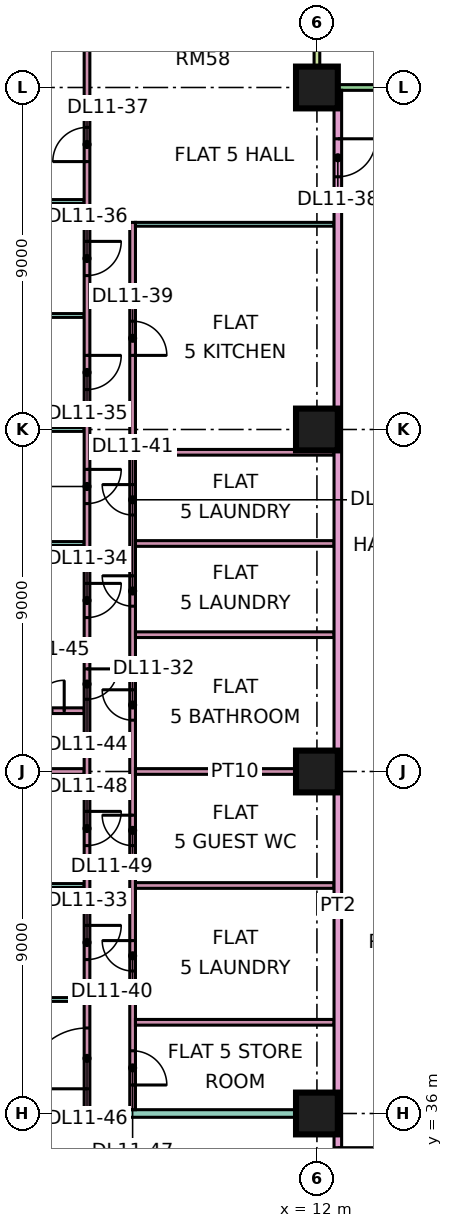
"""IFC4 building model, lengths in metres.
Left out: names, types, materials, properties, quantities, classifications, styles, units other than length and angle.
Written with IfcOpenShell. Run it as: python <this file> out.ifc"""

import sys

from ifc_helpers import new_model, si_unit, direction, frame, frame_2d, origin, origin_2d, place, context, subcontext, project, spatial, rectangle, extrude, element, fill, save


model = new_model("IFC4")
c1 = context("Model", 3, precision=1e-05, world=origin(), true_north=direction((0.0, 1.0)))
c2 = subcontext(c1, "Body", "Model", "MODEL_VIEW")
j1 = project(units=[si_unit("LENGTHUNIT", "METRE"), si_unit("PLANEANGLEUNIT", "RADIAN")], contexts=[c1])
p1 = place(None, origin())
s1 = spatial("IfcSite", under=j1, at=p1, CompositionType="ELEMENT")
p2 = place(p1, origin())
s2 = spatial("IfcBuilding", under=s1, at=p2, CompositionType="ELEMENT")
p3 = place(p2, frame((0.0, 0.0, 56.4)))
s3 = spatial("IfcBuildingStorey", under=s2, at=p3, CompositionType="ELEMENT", Elevation=56.4)
for number, where, z_axis, x_axis in (
    (1, (12.0, 36.0, 0.0), (0.0, 0.0, 1.0), (1.0, 0.0, 0.0)),
    (2, (12.0, 45.0, 0.0), (0.0, 0.0, 1.0), (1.0, 0.0, 0.0)),
    (3, (12.0, 54.0, 0.0), (0.0, 0.0, 1.0), (1.0, 0.0, 0.0)),
    (4, (12.0, 63.0, 0.0), (0.0, 0.0, 1.0), (1.0, 0.0, 0.0)),
):
    element("IfcColumn", number, at=place(p3, frame(where, z_axis=z_axis, x_axis=x_axis)), inside=s3, PredefinedType="COLUMN", context=c2, shape_type="SweptSolid", body=[
        extrude(rectangle(XDim=1.1, YDim=1.1, at=origin_2d()), origin(), (0.0, 0.0, 1.0), 3.75),
    ])
p4 = place(p3, frame((22.425, 63.0, 0.0), z_axis=(0.0, 0.0, 1.0), x_axis=(-1.0, 0.0, 0.0)))
e5 = element("IfcWall", 5, at=p4, inside=s3, PredefinedType="SOLIDWALL", context=c2, shape_type="SweptSolid", body=[
    extrude(rectangle(XDim=10.35, YDim=0.15, at=frame_2d((5.175, 0.0))), origin(), (0.0, 0.0, 1.0), 3.35),
])
p5 = place(p4, frame((2.512, 0.0, 0.0)))
e6 = element("IfcOpeningElement", 6, at=p5, cuts=e5, PredefinedType="OPENING", context=c2, shape_type="SweptSolid", body=[
    extrude(rectangle(XDim=1.8, YDim=2.4, at=frame_2d((0.9, 1.2))), frame((0.0, 0.085, 0.0), z_axis=(0.0, -1.0, 0.0), x_axis=(1.0, 0.0, 0.0)), (0.0, 0.0, 1.0), 0.17),
])
p6 = place(p3, frame((12.0, 64.5, 0.0), z_axis=(0.0, 0.0, 1.0), x_axis=(0.0, -1.0, 0.0)))
e7 = element("IfcWall", 7, at=p6, inside=s3, PredefinedType="SOLIDWALL", context=c2, shape_type="SweptSolid", body=[
    extrude(rectangle(XDim=1.5, YDim=0.15, at=frame_2d((0.75, 0.0))), origin(), (0.0, 0.0, 1.0), 3.35),
])
for number, where, z_axis, x_axis in (
    (8, (-1.351, 57.0, 0.0), (0.0, 0.0, 1.0), (1.0, 0.0, 0.0)),
    (9, (-1.351, 60.0, 0.0), (0.0, 0.0, 1.0), (1.0, 0.0, 0.0)),
):
    element("IfcWall", number, at=place(p3, frame(where, z_axis=z_axis, x_axis=x_axis)), inside=s3, PredefinedType="PARTITIONING", context=c2, shape_type="SweptSolid", body=[
        extrude(rectangle(XDim=7.226, YDim=0.1, at=frame_2d((3.613, 0.0))), origin(), (0.0, 0.0, 1.0), 3.35),
    ])
p7 = place(p3, frame((0.0, 36.0, 0.0), z_axis=(0.0, 0.0, 1.0), x_axis=(1.0, 0.0, 0.0)))
e10 = element("IfcWall", 10, at=p7, inside=s3, PredefinedType="PARTITIONING", context=c2, shape_type="SweptSolid", body=[
    extrude(rectangle(XDim=12.45, YDim=0.2, at=frame_2d((6.225, 0.0))), origin(), (0.0, 0.0, 1.0), 3.35),
])
p8 = place(p3, frame((0.0, 48.0, 0.0), z_axis=(0.0, 0.0, 1.0), x_axis=(1.0, 0.0, 0.0)))
e11 = element("IfcWall", 11, at=p8, inside=s3, PredefinedType="PARTITIONING", context=c2, shape_type="SweptSolid", body=[
    extrude(rectangle(XDim=5.875, YDim=0.1, at=frame_2d((2.938, 0.0))), origin(), (0.0, 0.0, 1.0), 3.35),
])
p9 = place(p3, frame((-1.35, 51.0, 0.0), z_axis=(0.0, 0.0, 1.0), x_axis=(1.0, 0.0, 0.0)))
e12 = element("IfcWall", 12, at=p9, inside=s3, PredefinedType="PARTITIONING", context=c2, shape_type="SweptSolid", body=[
    extrude(rectangle(XDim=7.225, YDim=0.1, at=frame_2d((3.613, 0.0))), origin(), (0.0, 0.0, 1.0), 3.35),
])
p10 = place(p3, frame((0.0, 54.0, 0.0), z_axis=(0.0, 0.0, 1.0), x_axis=(1.0, 0.0, 0.0)))
e13 = element("IfcWall", 13, at=p10, inside=s3, PredefinedType="PARTITIONING", context=c2, shape_type="SweptSolid", body=[
    extrude(rectangle(XDim=5.875, YDim=0.1, at=frame_2d((2.938, 0.0))), origin(), (0.0, 0.0, 1.0), 3.35),
])
for number, where, z_axis, x_axis in (
    (14, (0.074, 39.0, 0.0), (0.0, 0.0, 1.0), (1.0, 0.0, 0.0)),
    (15, (0.074, 42.0, 0.0), (0.0, 0.0, 1.0), (1.0, 0.0, 0.0)),
):
    element("IfcWall", number, at=place(p3, frame(where, z_axis=z_axis, x_axis=x_axis)), inside=s3, PredefinedType="PARTITIONING", context=c2, shape_type="SweptSolid", body=[
        extrude(rectangle(XDim=5.801, YDim=0.1, at=frame_2d((2.9, 0.0))), origin(), (0.0, 0.0, 1.0), 3.35),
    ])
p11 = place(p3, frame((0.074, 45.0, 0.0), z_axis=(0.0, 0.0, 1.0), x_axis=(1.0, 0.0, 0.0)))
e16 = element("IfcWall", 16, at=p11, inside=s3, PredefinedType="PARTITIONING", context=c2, shape_type="SweptSolid", body=[
    extrude(rectangle(XDim=5.801, YDim=0.15, at=frame_2d((2.9, 0.0))), origin(), (0.0, 0.0, 1.0), 3.35),
])
p12 = place(p3, frame((3.875, 46.6, 0.0), z_axis=(0.0, 0.0, 1.0), x_axis=(1.0, 0.0, 0.0)))
e17 = element("IfcWall", 17, at=p12, inside=s3, PredefinedType="PARTITIONING", context=c2, shape_type="SweptSolid", body=[
    extrude(rectangle(XDim=2.0, YDim=0.15, at=frame_2d((1.0, 0.0))), origin(), (0.0, 0.0, 1.0), 3.35),
])
p13 = place(p12, frame((0.675, 0.0, 0.0)))
e18 = element("IfcOpeningElement", 18, at=p13, cuts=e17, PredefinedType="OPENING", context=c2, shape_type="SweptSolid", body=[
    extrude(rectangle(XDim=0.8, YDim=2.1, at=frame_2d((0.4, 1.05))), frame((0.0, 0.085, 0.0), z_axis=(0.0, -1.0, 0.0), x_axis=(1.0, 0.0, 0.0)), (0.0, 0.0, 1.0), 0.17),
])
p14 = place(p3, frame((5.95, 36.1, 0.0), z_axis=(0.0, 0.0, 1.0), x_axis=(0.0, 1.0, 0.0)))
e19 = element("IfcWall", 19, at=p14, inside=s3, PredefinedType="PARTITIONING", context=c2, shape_type="SweptSolid", body=[
    extrude(rectangle(XDim=28.25, YDim=0.15, at=frame_2d((14.125, 0.0))), origin(), (0.0, 0.0, 1.0), 3.35),
])
p15 = place(p14, frame((3.95, 0.0, 0.0)))
e20 = element("IfcOpeningElement", 20, at=p15, cuts=e19, PredefinedType="OPENING", context=c2, shape_type="SweptSolid", body=[
    extrude(rectangle(XDim=0.9, YDim=2.1, at=frame_2d((0.45, 1.05))), frame((0.0, 0.085, 0.0), z_axis=(0.0, -1.0, 0.0), x_axis=(1.0, 0.0, 0.0)), (0.0, 0.0, 1.0), 0.17),
])
p16 = place(p14, frame((12.95, 0.0, 0.0)))
e21 = element("IfcOpeningElement", 21, at=p16, cuts=e19, PredefinedType="OPENING", context=c2, shape_type="SweptSolid", body=[
    extrude(rectangle(XDim=0.9, YDim=2.1, at=frame_2d((0.45, 1.05))), frame((0.0, 0.085, 0.0), z_axis=(0.0, -1.0, 0.0), x_axis=(1.0, 0.0, 0.0)), (0.0, 0.0, 1.0), 0.17),
])
p17 = place(p14, frame((18.95, 0.0, 0.0)))
e22 = element("IfcOpeningElement", 22, at=p17, cuts=e19, PredefinedType="OPENING", context=c2, shape_type="SweptSolid", body=[
    extrude(rectangle(XDim=0.9, YDim=2.1, at=frame_2d((0.45, 1.05))), frame((0.0, 0.085, 0.0), z_axis=(0.0, -1.0, 0.0), x_axis=(1.0, 0.0, 0.0)), (0.0, 0.0, 1.0), 0.17),
])
p18 = place(p14, frame((21.95, 0.0, 0.0)))
e23 = element("IfcOpeningElement", 23, at=p18, cuts=e19, PredefinedType="OPENING", context=c2, shape_type="SweptSolid", body=[
    extrude(rectangle(XDim=0.9, YDim=2.1, at=frame_2d((0.45, 1.05))), frame((0.0, 0.085, 0.0), z_axis=(0.0, -1.0, 0.0), x_axis=(1.0, 0.0, 0.0)), (0.0, 0.0, 1.0), 0.17),
])
p19 = place(p14, frame((24.95, 0.0, 0.0)))
e24 = element("IfcOpeningElement", 24, at=p19, cuts=e19, PredefinedType="OPENING", context=c2, shape_type="SweptSolid", body=[
    extrude(rectangle(XDim=0.9, YDim=2.1, at=frame_2d((0.45, 1.05))), frame((0.0, 0.085, 0.0), z_axis=(0.0, -1.0, 0.0), x_axis=(1.0, 0.0, 0.0)), (0.0, 0.0, 1.0), 0.17),
])
p20 = place(p14, frame((15.95, 0.0, 0.0)))
e25 = element("IfcOpeningElement", 25, at=p20, cuts=e19, PredefinedType="OPENING", context=c2, shape_type="SweptSolid", body=[
    extrude(rectangle(XDim=0.9, YDim=2.1, at=frame_2d((0.45, 1.05))), frame((0.0, 0.085, 0.0), z_axis=(0.0, -1.0, 0.0), x_axis=(1.0, 0.0, 0.0)), (0.0, 0.0, 1.0), 0.17),
])
p21 = place(p14, frame((10.8, 0.0, 0.0)))
e26 = element("IfcOpeningElement", 26, at=p21, cuts=e19, PredefinedType="OPENING", context=c2, shape_type="SweptSolid", body=[
    extrude(rectangle(XDim=0.8, YDim=2.1, at=frame_2d((0.4, 1.05))), frame((0.0, 0.085, 0.0), z_axis=(0.0, -1.0, 0.0), x_axis=(1.0, 0.0, 0.0)), (0.0, 0.0, 1.0), 0.17),
])
p22 = place(p14, frame((0.55, 0.0, 0.0)))
e27 = element("IfcOpeningElement", 27, at=p22, cuts=e19, PredefinedType="OPENING", context=c2, shape_type="SweptSolid", body=[
    extrude(rectangle(XDim=1.6, YDim=2.1, at=frame_2d((0.8, 1.05))), frame((0.0, 0.085, 0.0), z_axis=(0.0, -1.0, 0.0), x_axis=(1.0, 0.0, 0.0)), (0.0, 0.0, 1.0), 0.17),
])
p23 = place(p14, frame((6.95, 0.0, 0.0)))
e28 = element("IfcOpeningElement", 28, at=p23, cuts=e19, PredefinedType="OPENING", context=c2, shape_type="SweptSolid", body=[
    extrude(rectangle(XDim=0.9, YDim=2.1, at=frame_2d((0.45, 1.05))), frame((0.0, 0.085, 0.0), z_axis=(0.0, -1.0, 0.0), x_axis=(1.0, 0.0, 0.0)), (0.0, 0.0, 1.0), 0.17),
])
p24 = place(p3, frame((7.15, 36.1, 0.0), z_axis=(0.0, 0.0, 1.0), x_axis=(0.0, 1.0, 0.0)))
e29 = element("IfcWall", 29, at=p24, inside=s3, PredefinedType="PARTITIONING", context=c2, shape_type="SweptSolid", body=[
    extrude(rectangle(XDim=23.35, YDim=0.15, at=frame_2d((11.675, 0.0))), origin(), (0.0, 0.0, 1.0), 3.35),
])
p25 = place(p24, frame((10.25, 0.0, 0.0)))
e30 = element("IfcOpeningElement", 30, at=p25, cuts=e29, PredefinedType="OPENING", context=c2, shape_type="SweptSolid", body=[
    extrude(rectangle(XDim=0.8, YDim=2.1, at=frame_2d((0.4, 1.05))), frame((0.0, 0.085, 0.0), z_axis=(0.0, -1.0, 0.0), x_axis=(1.0, 0.0, 0.0)), (0.0, 0.0, 1.0), 0.17),
])
p26 = place(p24, frame((19.85, 0.0, 0.0)))
e31 = element("IfcOpeningElement", 31, at=p26, cuts=e29, PredefinedType="OPENING", context=c2, shape_type="SweptSolid", body=[
    extrude(rectangle(XDim=0.9, YDim=2.1, at=frame_2d((0.45, 1.05))), frame((0.0, 0.085, 0.0), z_axis=(0.0, -1.0, 0.0), x_axis=(1.0, 0.0, 0.0)), (0.0, 0.0, 1.0), 0.17),
])
p27 = place(p24, frame((3.65, 0.0, 0.0)))
e32 = element("IfcOpeningElement", 32, at=p27, cuts=e29, PredefinedType="OPENING", context=c2, shape_type="SweptSolid", body=[
    extrude(rectangle(XDim=0.8, YDim=2.1, at=frame_2d((0.4, 1.05))), frame((0.0, 0.085, 0.0), z_axis=(0.0, -1.0, 0.0), x_axis=(1.0, 0.0, 0.0)), (0.0, 0.0, 1.0), 0.17),
])
p28 = place(p24, frame((13.25, 0.0, 0.0)))
e33 = element("IfcOpeningElement", 33, at=p28, cuts=e29, PredefinedType="OPENING", context=c2, shape_type="SweptSolid", body=[
    extrude(rectangle(XDim=0.8, YDim=2.1, at=frame_2d((0.4, 1.05))), frame((0.0, 0.085, 0.0), z_axis=(0.0, -1.0, 0.0), x_axis=(1.0, 0.0, 0.0)), (0.0, 0.0, 1.0), 0.17),
])
p29 = place(p24, frame((15.65, 0.0, 0.0)))
e34 = element("IfcOpeningElement", 34, at=p29, cuts=e29, PredefinedType="OPENING", context=c2, shape_type="SweptSolid", body=[
    extrude(rectangle(XDim=0.8, YDim=2.1, at=frame_2d((0.4, 1.05))), frame((0.0, 0.085, 0.0), z_axis=(0.0, -1.0, 0.0), x_axis=(1.0, 0.0, 0.0)), (0.0, 0.0, 1.0), 0.17),
])
p30 = place(p24, frame((0.65, 0.0, 0.0)))
e35 = element("IfcOpeningElement", 35, at=p30, cuts=e29, PredefinedType="OPENING", context=c2, shape_type="SweptSolid", body=[
    extrude(rectangle(XDim=0.9, YDim=2.1, at=frame_2d((0.45, 1.05))), frame((0.0, 0.085, 0.0), z_axis=(0.0, -1.0, 0.0), x_axis=(1.0, 0.0, 0.0)), (0.0, 0.0, 1.0), 0.17),
])
p31 = place(p24, frame((6.95, 0.0, 0.0)))
e36 = element("IfcOpeningElement", 36, at=p31, cuts=e29, PredefinedType="OPENING", context=c2, shape_type="SweptSolid", body=[
    extrude(rectangle(XDim=0.8, YDim=2.1, at=frame_2d((0.4, 1.05))), frame((0.0, 0.085, 0.0), z_axis=(0.0, -1.0, 0.0), x_axis=(1.0, 0.0, 0.0)), (0.0, 0.0, 1.0), 0.17),
])
for number, where, z_axis, x_axis in (
    (37, (7.225, 38.4, 0.0), (0.0, 0.0, 1.0), (1.0, 0.0, 0.0)),
    (38, (7.225, 42.0, 0.0), (0.0, 0.0, 1.0), (1.0, 0.0, 0.0)),
    (39, (7.225, 45.0, 0.0), (0.0, 0.0, 1.0), (1.0, 0.0, 0.0)),
    (40, (7.225, 48.6, 0.0), (0.0, 0.0, 1.0), (1.0, 0.0, 0.0)),
    (41, (7.225, 51.0, 0.0), (0.0, 0.0, 1.0), (1.0, 0.0, 0.0)),
    (42, (7.225, 53.4, 0.0), (0.0, 0.0, 1.0), (1.0, 0.0, 0.0)),
):
    element("IfcWall", number, at=place(p3, frame(where, z_axis=z_axis, x_axis=x_axis)), inside=s3, PredefinedType="PARTITIONING", context=c2, shape_type="SweptSolid", body=[
        extrude(rectangle(XDim=5.225, YDim=0.15, at=frame_2d((2.612, 0.0))), origin(), (0.0, 0.0, 1.0), 3.35),
    ])
p32 = place(p3, frame((7.225, 59.4, 0.0), z_axis=(0.0, 0.0, 1.0), x_axis=(1.0, 0.0, 0.0)))
e43 = element("IfcWall", 43, at=p32, inside=s3, PredefinedType="PARTITIONING", context=c2, shape_type="SweptSolid", body=[
    extrude(rectangle(XDim=5.225, YDim=0.1, at=frame_2d((2.612, 0.0))), origin(), (0.0, 0.0, 1.0), 3.35),
])
p33 = place(p3, frame((12.55, 20.0, 0.0), z_axis=(0.0, 0.0, 1.0), x_axis=(0.0, 1.0, 0.0)))
e44 = element("IfcWall", 44, at=p33, inside=s3, PredefinedType="PARTITIONING", context=c2, shape_type="SweptSolid", body=[
    extrude(rectangle(XDim=42.926, YDim=0.2, at=frame_2d((21.463, 0.0))), origin(), (0.0, 0.0, 1.0), 3.35),
])
p34 = place(p33, frame((40.65, 0.0, 0.0)))
e45 = element("IfcOpeningElement", 45, at=p34, cuts=e44, PredefinedType="OPENING", context=c2, shape_type="SweptSolid", body=[
    extrude(rectangle(XDim=1.0, YDim=2.1, at=frame_2d((0.5, 1.05))), frame((0.0, 0.11, 0.0), z_axis=(0.0, -1.0, 0.0), x_axis=(1.0, 0.0, 0.0)), (0.0, 0.0, 1.0), 0.22),
])
p35 = place(p33, frame((0.6, 0.0, 0.0)))
e46 = element("IfcOpeningElement", 46, at=p35, cuts=e44, PredefinedType="OPENING", context=c2, shape_type="SweptSolid", body=[
    extrude(rectangle(XDim=1.2, YDim=2.1, at=frame_2d((0.6, 1.05))), frame((0.0, 0.11, 0.0), z_axis=(0.0, -1.0, 0.0), x_axis=(1.0, 0.0, 0.0)), (0.0, 0.0, 1.0), 0.22),
])
p36 = place(p33, frame((14.1, 0.0, 0.0)))
e47 = element("IfcOpeningElement", 47, at=p36, cuts=e44, PredefinedType="OPENING", context=c2, shape_type="SweptSolid", body=[
    extrude(rectangle(XDim=1.0, YDim=2.1, at=frame_2d((0.5, 1.05))), frame((0.0, 0.11, 0.0), z_axis=(0.0, -1.0, 0.0), x_axis=(1.0, 0.0, 0.0)), (0.0, 0.0, 1.0), 0.22),
])
p37 = place(p25, frame((0.8, 0.0, 0.0), z_axis=(0.0, 0.0, 1.0), x_axis=(-1.0, 0.0, 0.0)))
e48 = element("IfcDoor", 48, at=p37, inside=s3, OperationType="SINGLE_SWING_RIGHT", PredefinedType="DOOR", context=c2, shape_type="SweptSolid", body=[
    extrude(rectangle(XDim=0.8, YDim=2.1, at=frame_2d((0.4, 1.05))), frame((0.0, 0.025, 0.0), z_axis=(0.0, -1.0, 0.0), x_axis=(1.0, 0.0, 0.0)), (0.0, 0.0, 1.0), 0.05),
])
fill(e30, e48)
p38 = place(p15, origin())
e49 = element("IfcDoor", 49, at=p38, inside=s3, OperationType="SINGLE_SWING_RIGHT", PredefinedType="DOOR", context=c2, shape_type="SweptSolid", body=[
    extrude(rectangle(XDim=0.9, YDim=2.1, at=frame_2d((0.45, 1.05))), frame((0.0, 0.025, 0.0), z_axis=(0.0, -1.0, 0.0), x_axis=(1.0, 0.0, 0.0)), (0.0, 0.0, 1.0), 0.05),
])
fill(e20, e49)
p39 = place(p16, origin())
e50 = element("IfcDoor", 50, at=p39, inside=s3, OperationType="SINGLE_SWING_RIGHT", PredefinedType="DOOR", context=c2, shape_type="SweptSolid", body=[
    extrude(rectangle(XDim=0.9, YDim=2.1, at=frame_2d((0.45, 1.05))), frame((0.0, 0.025, 0.0), z_axis=(0.0, -1.0, 0.0), x_axis=(1.0, 0.0, 0.0)), (0.0, 0.0, 1.0), 0.05),
])
fill(e21, e50)
p40 = place(p17, origin())
e51 = element("IfcDoor", 51, at=p40, inside=s3, OperationType="SINGLE_SWING_RIGHT", PredefinedType="DOOR", context=c2, shape_type="SweptSolid", body=[
    extrude(rectangle(XDim=0.9, YDim=2.1, at=frame_2d((0.45, 1.05))), frame((0.0, 0.025, 0.0), z_axis=(0.0, -1.0, 0.0), x_axis=(1.0, 0.0, 0.0)), (0.0, 0.0, 1.0), 0.05),
])
fill(e22, e51)
p41 = place(p18, origin())
e52 = element("IfcDoor", 52, at=p41, inside=s3, OperationType="SINGLE_SWING_RIGHT", PredefinedType="DOOR", context=c2, shape_type="SweptSolid", body=[
    extrude(rectangle(XDim=0.9, YDim=2.1, at=frame_2d((0.45, 1.05))), frame((0.0, 0.025, 0.0), z_axis=(0.0, -1.0, 0.0), x_axis=(1.0, 0.0, 0.0)), (0.0, 0.0, 1.0), 0.05),
])
fill(e23, e52)
p42 = place(p19, origin())
e53 = element("IfcDoor", 53, at=p42, inside=s3, OperationType="SINGLE_SWING_LEFT", PredefinedType="DOOR", context=c2, shape_type="SweptSolid", body=[
    extrude(rectangle(XDim=0.9, YDim=2.1, at=frame_2d((0.45, 1.05))), frame((0.0, 0.025, 0.0), z_axis=(0.0, -1.0, 0.0), x_axis=(1.0, 0.0, 0.0)), (0.0, 0.0, 1.0), 0.05),
])
fill(e24, e53)
p43 = place(p34, origin())
e54 = element("IfcDoor", 54, at=p43, inside=s3, OperationType="SINGLE_SWING_RIGHT", PredefinedType="DOOR", context=c2, shape_type="SweptSolid", body=[
    extrude(rectangle(XDim=1.0, YDim=2.1, at=frame_2d((0.5, 1.05))), frame((0.0, 0.025, 0.0), z_axis=(0.0, -1.0, 0.0), x_axis=(1.0, 0.0, 0.0)), (0.0, 0.0, 1.0), 0.05),
])
fill(e45, e54)
p44 = place(p26, frame((0.9, 0.0, 0.0), z_axis=(0.0, 0.0, 1.0), x_axis=(-1.0, 0.0, 0.0)))
e55 = element("IfcDoor", 55, at=p44, inside=s3, OperationType="SINGLE_SWING_LEFT", PredefinedType="DOOR", context=c2, shape_type="SweptSolid", body=[
    extrude(rectangle(XDim=0.9, YDim=2.1, at=frame_2d((0.45, 1.05))), frame((0.0, 0.025, 0.0), z_axis=(0.0, -1.0, 0.0), x_axis=(1.0, 0.0, 0.0)), (0.0, 0.0, 1.0), 0.05),
])
fill(e31, e55)
p45 = place(p27, frame((0.8, 0.0, 0.0), z_axis=(0.0, 0.0, 1.0), x_axis=(-1.0, 0.0, 0.0)))
e56 = element("IfcDoor", 56, at=p45, inside=s3, OperationType="SINGLE_SWING_RIGHT", PredefinedType="DOOR", context=c2, shape_type="SweptSolid", body=[
    extrude(rectangle(XDim=0.8, YDim=2.1, at=frame_2d((0.4, 1.05))), frame((0.0, 0.025, 0.0), z_axis=(0.0, -1.0, 0.0), x_axis=(1.0, 0.0, 0.0)), (0.0, 0.0, 1.0), 0.05),
])
fill(e32, e56)
p46 = place(p28, frame((0.8, 0.0, 0.0), z_axis=(0.0, 0.0, 1.0), x_axis=(-1.0, 0.0, 0.0)))
e57 = element("IfcDoor", 57, at=p46, inside=s3, OperationType="SINGLE_SWING_RIGHT", PredefinedType="DOOR", context=c2, shape_type="SweptSolid", body=[
    extrude(rectangle(XDim=0.8, YDim=2.1, at=frame_2d((0.4, 1.05))), frame((0.0, 0.025, 0.0), z_axis=(0.0, -1.0, 0.0), x_axis=(1.0, 0.0, 0.0)), (0.0, 0.0, 1.0), 0.05),
])
fill(e33, e57)
p47 = place(p29, frame((0.8, 0.0, 0.0), z_axis=(0.0, 0.0, 1.0), x_axis=(-1.0, 0.0, 0.0)))
e58 = element("IfcDoor", 58, at=p47, inside=s3, OperationType="SINGLE_SWING_RIGHT", PredefinedType="DOOR", context=c2, shape_type="SweptSolid", body=[
    extrude(rectangle(XDim=0.8, YDim=2.1, at=frame_2d((0.4, 1.05))), frame((0.0, 0.025, 0.0), z_axis=(0.0, -1.0, 0.0), x_axis=(1.0, 0.0, 0.0)), (0.0, 0.0, 1.0), 0.05),
])
fill(e34, e58)
p48 = place(p20, origin())
e59 = element("IfcDoor", 59, at=p48, inside=s3, OperationType="SINGLE_SWING_RIGHT", PredefinedType="DOOR", context=c2, shape_type="SweptSolid", body=[
    extrude(rectangle(XDim=0.9, YDim=2.1, at=frame_2d((0.45, 1.05))), frame((0.0, 0.025, 0.0), z_axis=(0.0, -1.0, 0.0), x_axis=(1.0, 0.0, 0.0)), (0.0, 0.0, 1.0), 0.05),
])
fill(e25, e59)
p49 = place(p21, origin())
e60 = element("IfcDoor", 60, at=p49, inside=s3, OperationType="SINGLE_SWING_RIGHT", PredefinedType="DOOR", context=c2, shape_type="SweptSolid", body=[
    extrude(rectangle(XDim=0.8, YDim=2.1, at=frame_2d((0.4, 1.05))), frame((0.0, 0.025, 0.0), z_axis=(0.0, -1.0, 0.0), x_axis=(1.0, 0.0, 0.0)), (0.0, 0.0, 1.0), 0.05),
])
fill(e26, e60)
p50 = place(p13, frame((0.8, 0.0, 0.0), z_axis=(0.0, 0.0, 1.0), x_axis=(-1.0, 0.0, 0.0)))
e61 = element("IfcDoor", 61, at=p50, inside=s3, OperationType="SINGLE_SWING_RIGHT", PredefinedType="DOOR", context=c2, shape_type="SweptSolid", body=[
    extrude(rectangle(XDim=0.8, YDim=2.1, at=frame_2d((0.4, 1.05))), frame((0.0, 0.025, 0.0), z_axis=(0.0, -1.0, 0.0), x_axis=(1.0, 0.0, 0.0)), (0.0, 0.0, 1.0), 0.05),
])
fill(e18, e61)
p51 = place(p22, origin())
e62 = element("IfcDoor", 62, at=p51, inside=s3, OperationType="DOUBLE_DOOR_SINGLE_SWING", PredefinedType="DOOR", context=c2, shape_type="SweptSolid", body=[
    extrude(rectangle(XDim=1.6, YDim=2.1, at=frame_2d((0.8, 1.05))), frame((0.0, 0.025, 0.0), z_axis=(0.0, -1.0, 0.0), x_axis=(1.0, 0.0, 0.0)), (0.0, 0.0, 1.0), 0.05),
])
fill(e27, e62)
p52 = place(p30, frame((0.9, 0.0, 0.0), z_axis=(0.0, 0.0, 1.0), x_axis=(-1.0, 0.0, 0.0)))
e63 = element("IfcDoor", 63, at=p52, inside=s3, OperationType="SINGLE_SWING_LEFT", PredefinedType="DOOR", context=c2, shape_type="SweptSolid", body=[
    extrude(rectangle(XDim=0.9, YDim=2.1, at=frame_2d((0.45, 1.05))), frame((0.0, 0.025, 0.0), z_axis=(0.0, -1.0, 0.0), x_axis=(1.0, 0.0, 0.0)), (0.0, 0.0, 1.0), 0.05),
])
fill(e35, e63)
p53 = place(p23, origin())
e64 = element("IfcDoor", 64, at=p53, inside=s3, OperationType="SINGLE_SWING_RIGHT", PredefinedType="DOOR", context=c2, shape_type="SweptSolid", body=[
    extrude(rectangle(XDim=0.9, YDim=2.1, at=frame_2d((0.45, 1.05))), frame((0.0, 0.025, 0.0), z_axis=(0.0, -1.0, 0.0), x_axis=(1.0, 0.0, 0.0)), (0.0, 0.0, 1.0), 0.05),
])
fill(e28, e64)
p54 = place(p31, frame((0.8, 0.0, 0.0), z_axis=(0.0, 0.0, 1.0), x_axis=(-1.0, 0.0, 0.0)))
e65 = element("IfcDoor", 65, at=p54, inside=s3, OperationType="SINGLE_SWING_RIGHT", PredefinedType="DOOR", context=c2, shape_type="SweptSolid", body=[
    extrude(rectangle(XDim=0.8, YDim=2.1, at=frame_2d((0.4, 1.05))), frame((0.0, 0.025, 0.0), z_axis=(0.0, -1.0, 0.0), x_axis=(1.0, 0.0, 0.0)), (0.0, 0.0, 1.0), 0.05),
])
fill(e36, e65)
p55 = place(p36, origin())
e66 = element("IfcDoor", 66, at=p55, inside=s3, OperationType="SINGLE_SWING_RIGHT", PredefinedType="DOOR", context=c2, shape_type="SweptSolid", body=[
    extrude(rectangle(XDim=1.0, YDim=2.1, at=frame_2d((0.5, 1.05))), frame((0.0, 0.025, 0.0), z_axis=(0.0, -1.0, 0.0), x_axis=(1.0, 0.0, 0.0)), (0.0, 0.0, 1.0), 0.05),
])
fill(e47, e66)
save(model, sys.argv[1])
